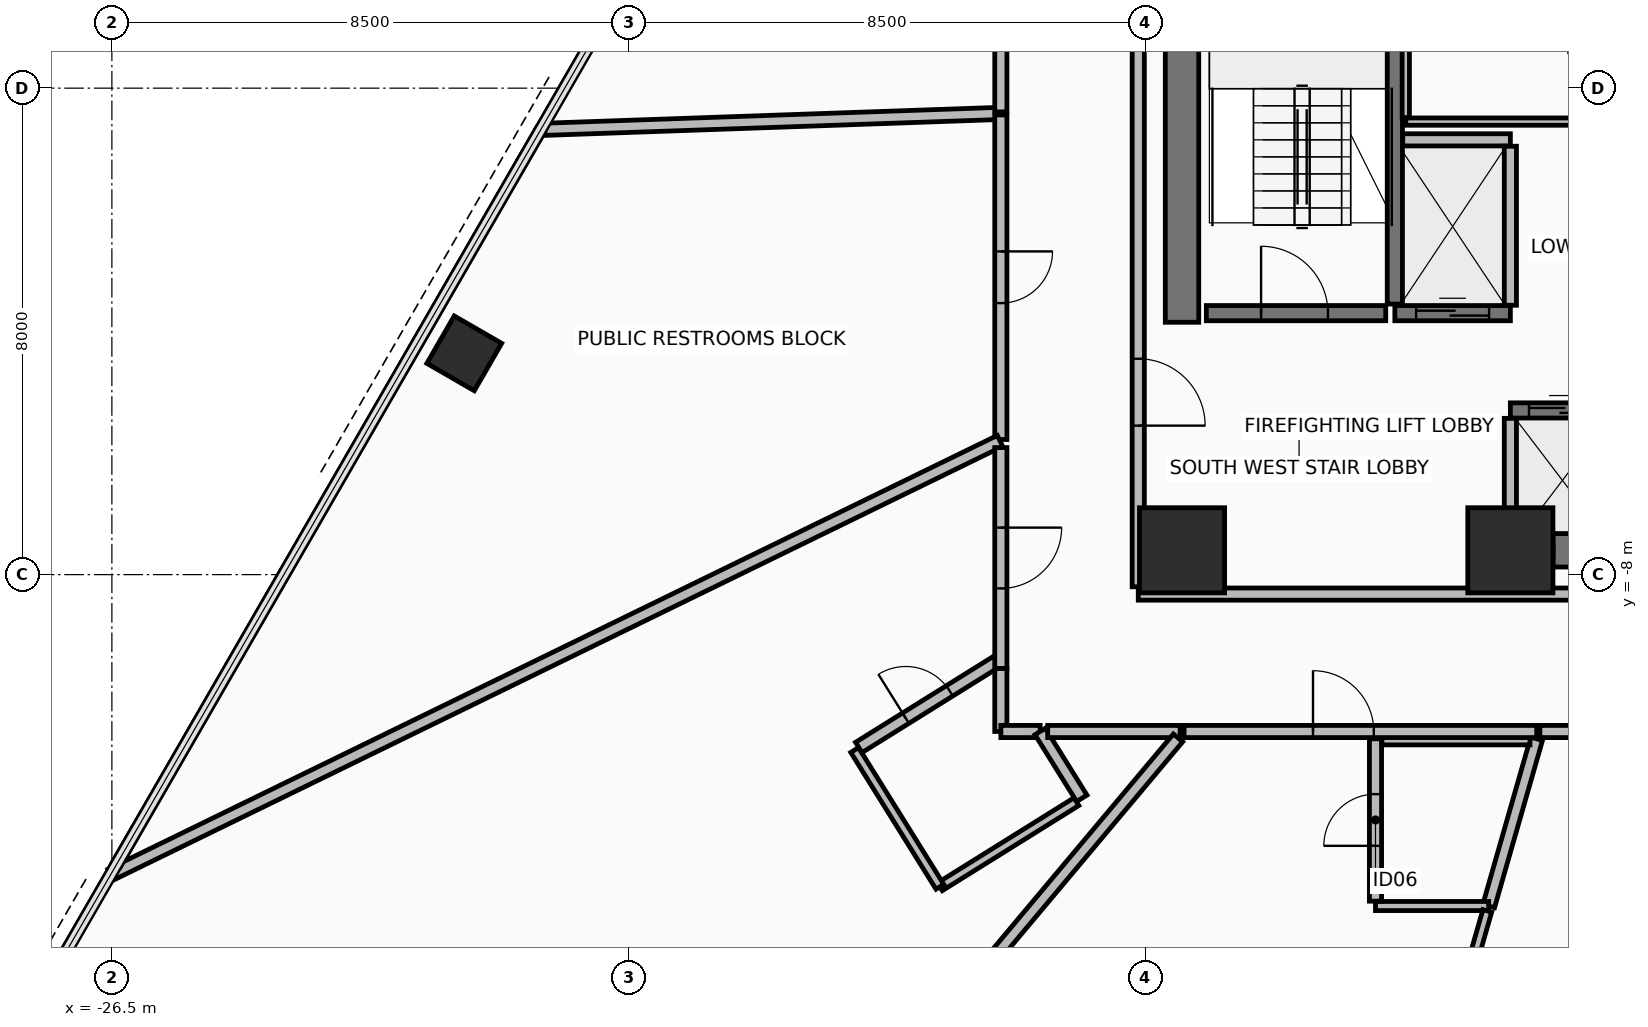
"""IFC4 building model, lengths in metres.
Left out: names, types, materials, properties, quantities, classifications, styles, units other than length and angle.
Written with IfcOpenShell. Run it as: python <this file> out.ifc"""

import sys

from ifc_helpers import new_model, si_unit, direction, frame, frame_2d, origin, origin_2d, place, context, subcontext, project, spatial, rectangle, hollow_rectangle, extrude, element, fill, save


model = new_model("IFC4")
c1 = context("Model", 3, precision=1e-05, world=origin(), true_north=direction((0.0, 1.0)))
c2 = subcontext(c1, "Body", "Model", "MODEL_VIEW")
j1 = project(units=[si_unit("LENGTHUNIT", "METRE"), si_unit("PLANEANGLEUNIT", "RADIAN")], contexts=[c1])
p1 = place(None, origin())
s1 = spatial("IfcSite", under=j1, at=p1, CompositionType="ELEMENT")
p2 = place(p1, origin())
s2 = spatial("IfcBuilding", under=s1, at=p2, CompositionType="ELEMENT")
p3 = place(p2, frame((0.0, 0.0, 35.25)))
s3 = spatial("IfcBuildingStorey", under=s2, at=p3, CompositionType="ELEMENT", Elevation=35.25)
for number, where, z_axis, x_axis in (
    (1, (-8.9, -7.6, 0.0), (0.0, 0.0, 1.0), (1.0, 0.0, 0.0)),
    (2, (-3.5, -7.6, 0.0), (0.0, 0.0, 1.0), (1.0, 0.0, 0.0)),
):
    element("IfcColumn", number, at=place(p3, frame(where, z_axis=z_axis, x_axis=x_axis)), inside=s3, PredefinedType="COLUMN", context=c2, shape_type="SweptSolid", body=[
        extrude(rectangle(XDim=1.4, YDim=1.4, at=origin_2d()), origin(), (0.0, 0.0, 1.0), 3.4),
    ])
p4 = place(p3, frame((-20.705, -4.361, 0.0), z_axis=(0.0, 0.0, 1.0), x_axis=(0.500001511499, 0.866024531118, 0.0)))
e3 = element("IfcColumn", 3, at=p4, inside=s3, PredefinedType="COLUMN", context=c2, shape_type="SweptSolid", body=[
    extrude(hollow_rectangle(XDim=0.9, YDim=0.9, WallThickness=0.05, at=origin_2d()), origin(), (0.0, 0.0, 1.0), 3.4),
])
p5 = place(p3, frame((-2.8, -7.6, 0.0), z_axis=(0.0, 0.0, 1.0), x_axis=(1.0, 0.0, 0.0)))
e4 = element("IfcWall", 4, at=p5, inside=s3, PredefinedType="SHEAR", context=c2, shape_type="SweptSolid", body=[
    extrude(rectangle(XDim=5.38, YDim=0.55, at=frame_2d((2.69, 0.0))), origin(), (0.0, 0.0, 1.0), 3.225),
])
p6 = place(p3, frame((-8.9, -3.85, 0.0), z_axis=(0.0, 0.0, 1.0), x_axis=(0.0, 1.0, 0.0)))
e5 = element("IfcWall", 5, at=p6, inside=s3, PredefinedType="SHEAR", context=c2, shape_type="SweptSolid", body=[
    extrude(rectangle(XDim=10.7, YDim=0.55, at=frame_2d((5.35, 0.0))), origin(), (0.0, 0.0, 1.0), 3.225),
])
p7 = place(p3, frame((-9.62, -8.32, 0.0), z_axis=(0.0, 0.0, 1.0), x_axis=(1.0, 0.0, 0.0)))
e6 = element("IfcWall", 6, at=p7, inside=s3, PredefinedType="PARTITIONING", context=c2, shape_type="SweptSolid", body=[
    extrude(rectangle(XDim=19.24, YDim=0.2, at=frame_2d((9.62, 0.0))), origin(), (0.0, 0.0, 1.0), 2.62),
])
p8 = place(p7, frame((15.02, 0.0, 0.0)))
e7 = element("IfcOpeningElement", 7, at=p8, cuts=e6, PredefinedType="OPENING", context=c2, shape_type="SweptSolid", body=[
    extrude(rectangle(XDim=0.9, YDim=2.1, at=frame_2d((0.45, 1.05))), frame((0.0, 0.11, 0.0), z_axis=(0.0, -1.0, 0.0), x_axis=(1.0, 0.0, 0.0)), (0.0, 0.0, 1.0), 0.22),
])
p9 = place(p3, frame((-9.62, 8.2, 0.0), z_axis=(0.0, 0.0, 1.0), x_axis=(0.0, -1.0, 0.0)))
e8 = element("IfcWall", 8, at=p9, inside=s3, PredefinedType="PARTITIONING", context=c2, shape_type="SweptSolid", body=[
    extrude(rectangle(XDim=16.4, YDim=0.2, at=frame_2d((8.2, 0.0))), origin(), (0.0, 0.0, 1.0), 2.62),
])
p10 = place(p9, frame((12.65, 0.0, 0.0)))
e9 = element("IfcOpeningElement", 9, at=p10, cuts=e8, PredefinedType="OPENING", context=c2, shape_type="SweptSolid", body=[
    extrude(rectangle(XDim=1.1, YDim=2.15, at=frame_2d((0.55, 1.075))), frame((0.0, 0.11, 0.0), z_axis=(0.0, -1.0, 0.0), x_axis=(1.0, 0.0, 0.0)), (0.0, 0.0, 1.0), 0.22),
])
p11 = place(p3, frame((-5.4, -3.55, 0.0), z_axis=(0.0, 0.0, 1.0), x_axis=(0.0, 1.0, 0.0)))
e10 = element("IfcWall", 10, at=p11, inside=s3, PredefinedType="SHEAR", context=c2, shape_type="SweptSolid", body=[
    extrude(rectangle(XDim=7.3, YDim=0.25, at=frame_2d((3.65, 0.0))), origin(), (0.0, 0.0, 1.0), 3.225),
])
p12 = place(p3, frame((-8.5, -3.7, 0.0), z_axis=(0.0, 0.0, 1.0), x_axis=(1.0, 0.0, 0.0)))
e11 = element("IfcWall", 11, at=p12, inside=s3, PredefinedType="SHEAR", context=c2, shape_type="SweptSolid", body=[
    extrude(rectangle(XDim=2.95, YDim=0.25, at=frame_2d((1.475, 0.0))), origin(), (0.0, 0.0, 1.0), 3.225),
])
p13 = place(p12, frame((0.9, 0.0, 0.0)))
e12 = element("IfcOpeningElement", 12, at=p13, cuts=e11, PredefinedType="OPENING", context=c2, shape_type="SweptSolid", body=[
    extrude(rectangle(XDim=1.1, YDim=2.15, at=frame_2d((0.55, 1.075))), frame((0.0, 0.135, 0.0), z_axis=(0.0, -1.0, 0.0), x_axis=(1.0, 0.0, 0.0)), (0.0, 0.0, 1.0), 0.27),
])
p14 = place(p3, frame((-3.5, -5.3, 0.0), z_axis=(0.0, 0.0, 1.0), x_axis=(1.0, 0.0, 0.0)))
e13 = element("IfcWall", 13, at=p14, inside=s3, PredefinedType="SHEAR", context=c2, shape_type="SweptSolid", body=[
    extrude(rectangle(XDim=1.712, YDim=0.25, at=frame_2d((0.856, 0.0))), origin(), (0.0, 0.0, 1.0), 3.225),
])
p15 = place(p14, frame((0.306, 0.0, 0.0)))
e14 = element("IfcOpeningElement", 14, at=p15, cuts=e13, PredefinedType="OPENING", context=c2, shape_type="SweptSolid", body=[
    extrude(rectangle(XDim=1.1, YDim=2.2, at=frame_2d((0.55, 1.1))), frame((0.0, 0.135, 0.0), z_axis=(0.0, -1.0, 0.0), x_axis=(1.0, 0.0, 0.0)), (0.0, 0.0, 1.0), 0.27),
])
p16 = place(p3, frame((-3.5, -7.6, 0.0), z_axis=(0.0, 0.0, 1.0), x_axis=(1.0, 0.0, 0.0)))
e15 = element("IfcWall", 15, at=p16, inside=s3, PredefinedType="PARTITIONING", context=c2, shape_type="SweptSolid", body=[
    extrude(rectangle(XDim=0.7, YDim=0.2, at=frame_2d((0.35, 0.0))), origin(), (0.0, 0.0, 1.0), 2.42),
])
p17 = place(p3, frame((-3.5, -7.495, 0.0), z_axis=(0.0, 0.0, 1.0), x_axis=(0.0, 1.0, 0.0)))
e16 = element("IfcWall", 16, at=p17, inside=s3, PredefinedType="PARTITIONING", context=c2, shape_type="SweptSolid", body=[
    extrude(rectangle(XDim=2.065, YDim=0.2, at=frame_2d((1.033, 0.0))), origin(), (0.0, 0.0, 1.0), 2.42),
])
p18 = place(p3, frame((-5.4, -3.7, 0.0), z_axis=(0.0, 0.0, 1.0), x_axis=(1.0, 0.0, 0.0)))
e17 = element("IfcWall", 17, at=p18, inside=s3, PredefinedType="SHEAR", context=c2, shape_type="SweptSolid", body=[
    extrude(rectangle(XDim=1.9, YDim=0.25, at=frame_2d((0.95, 0.0))), origin(), (0.0, 0.0, 1.0), 3.225),
])
p19 = place(p18, frame((0.35, 0.0, 0.0)))
e18 = element("IfcOpeningElement", 18, at=p19, cuts=e17, PredefinedType="OPENING", context=c2, shape_type="SweptSolid", body=[
    extrude(rectangle(XDim=1.2, YDim=2.2, at=frame_2d((0.6, 1.1))), frame((0.0, 0.135, 0.0), z_axis=(0.0, -1.0, 0.0), x_axis=(1.0, 0.0, 0.0)), (0.0, 0.0, 1.0), 0.27),
])
p20 = place(p3, frame((-5.27, -0.85, 0.0), z_axis=(0.0, 0.0, 1.0), x_axis=(1.0, 0.0, 0.0)))
e19 = element("IfcWall", 19, at=p20, inside=s3, PredefinedType="PARTITIONING", context=c2, shape_type="SweptSolid", body=[
    extrude(rectangle(XDim=1.77, YDim=0.2, at=frame_2d((0.885, 0.0))), origin(), (0.0, 0.0, 1.0), 3.225),
])
p21 = place(p3, frame((-3.5, -3.57, 0.0), z_axis=(0.0, 0.0, 1.0), x_axis=(0.0, 1.0, 0.0)))
e20 = element("IfcWall", 20, at=p21, inside=s3, PredefinedType="PARTITIONING", context=c2, shape_type="SweptSolid", body=[
    extrude(rectangle(XDim=2.615, YDim=0.2, at=frame_2d((1.308, 0.0))), origin(), (0.0, 0.0, 1.0), 3.225),
])
p22 = place(p3, frame((-5.22, -0.55, 0.0), z_axis=(0.0, 0.0, 1.0), x_axis=(1.0, 0.0, 0.0)))
e21 = element("IfcWall", 21, at=p22, inside=s3, PredefinedType="PARTITIONING", context=c2, shape_type="SweptSolid", body=[
    extrude(rectangle(XDim=3.47, YDim=0.12, at=frame_2d((1.735, 0.0))), origin(), (0.0, 0.0, 1.0), 3.225),
])
p23 = place(p3, frame((-5.22, 1.275, 0.0), z_axis=(0.0, 0.0, 1.0), x_axis=(0.0, -1.0, 0.0)))
e22 = element("IfcWall", 22, at=p23, inside=s3, PredefinedType="PARTITIONING", context=c2, shape_type="SweptSolid", body=[
    extrude(rectangle(XDim=1.76, YDim=0.12, at=frame_2d((0.88, 0.0))), origin(), (0.0, 0.0, 1.0), 3.225),
])
p24 = place(p3, frame((-11.88, -9.542, 0.0), z_axis=(0.0, 0.0, 1.0), x_axis=(0.0, -1.0, 0.0)))
e23 = element("IfcWall", 23, at=p24, inside=s3, PredefinedType="PARTITIONING", context=c2, shape_type="SweptSolid", body=[
    extrude(rectangle(XDim=1.037, YDim=0.2, at=frame_2d((0.519, 0.0))), origin(), (0.0, 0.0, 1.0), 2.62),
])
p25 = place(p3, frame((-11.879, -10.58, 0.0), z_axis=(0.0, 0.0, 1.0), x_axis=(1.0, 0.0, 0.0)))
e24 = element("IfcWall", 24, at=p25, inside=s3, PredefinedType="PARTITIONING", context=c2, shape_type="SweptSolid", body=[
    extrude(rectangle(XDim=0.646, YDim=0.2, at=frame_2d((0.323, 0.0))), origin(), (0.0, 0.0, 1.0), 3.225),
])
p26 = place(p3, frame((-11.233, -10.58, 0.0), z_axis=(0.0, 0.0, 1.0), x_axis=(0.528981470097, -0.848633374487, 0.0)))
e25 = element("IfcWall", 25, at=p26, inside=s3, PredefinedType="PARTITIONING", context=c2, shape_type="SweptSolid", body=[
    extrude(rectangle(XDim=1.295, YDim=0.2, at=frame_2d((0.647, 0.0))), origin(), (0.0, 0.0, 1.0), 3.225),
])
p27 = place(p3, frame((-10.637, -11.734, 0.0), z_axis=(0.0, 0.0, 1.0), x_axis=(-0.848630335856, -0.528986344876, 0.0)))
e26 = element("IfcWall", 26, at=p27, inside=s3, PredefinedType="PARTITIONING", context=c2, shape_type="SweptSolid", body=[
    extrude(rectangle(XDim=2.645, YDim=0.15, at=frame_2d((1.323, 0.0))), origin(), (0.0, 0.0, 1.0), 3.225),
])
p28 = place(p3, frame((-12.882, -13.133, 0.0), z_axis=(0.0, 0.0, 1.0), x_axis=(-0.529013096747, 0.848613659724, 0.0)))
e27 = element("IfcWall", 27, at=p28, inside=s3, PredefinedType="PARTITIONING", context=c2, shape_type="SweptSolid", body=[
    extrude(rectangle(XDim=2.65, YDim=0.15, at=frame_2d((1.325, 0.0))), origin(), (0.0, 0.0, 1.0), 2.62),
])
p29 = place(p3, frame((-14.216, -10.842, 0.0), z_axis=(0.0, 0.0, 1.0), x_axis=(0.848598757422, 0.529037001449, 0.0)))
e28 = element("IfcWall", 28, at=p29, inside=s3, PredefinedType="PARTITIONING", context=c2, shape_type="SweptSolid", body=[
    extrude(rectangle(XDim=2.67, YDim=0.2, at=frame_2d((1.335, 0.0))), origin(), (0.0, 0.0, 1.0), 2.62),
])
p30 = place(p29, frame((0.91, 0.0, 0.0)))
e29 = element("IfcOpeningElement", 29, at=p30, cuts=e28, PredefinedType="OPENING", context=c2, shape_type="SweptSolid", body=[
    extrude(rectangle(XDim=0.85, YDim=2.1, at=frame_2d((0.425, 1.05))), frame((0.0, 0.11, 0.0), z_axis=(0.0, -1.0, 0.0), x_axis=(1.0, 0.0, 0.0)), (0.0, 0.0, 1.0), 0.22),
])
p31 = place(p3, frame((-3.068, -10.7, 0.0), z_axis=(0.0, 0.0, 1.0), x_axis=(-0.275645239358, -0.961259435334, 0.0)))
e30 = element("IfcWall", 30, at=p31, inside=s3, PredefinedType="PARTITIONING", context=c2, shape_type="SweptSolid", body=[
    extrude(rectangle(XDim=2.861, YDim=0.2, at=frame_2d((1.43, 0.0))), origin(), (0.0, 0.0, 1.0), 3.225),
])
p32 = place(p3, frame((-3.857, -13.45, 0.0), z_axis=(0.0, 0.0, 1.0), x_axis=(-1.0, 0.0, 0.0)))
e31 = element("IfcWall", 31, at=p32, inside=s3, PredefinedType="PARTITIONING", context=c2, shape_type="SweptSolid", body=[
    extrude(rectangle(XDim=1.862, YDim=0.15, at=frame_2d((0.931, 0.0))), origin(), (0.0, 0.0, 1.0), 3.225),
])
p33 = place(p3, frame((-5.718, -13.37, 0.0), z_axis=(0.0, 0.0, 1.0), x_axis=(0.0, 1.0, 0.0)))
e32 = element("IfcWall", 32, at=p33, inside=s3, PredefinedType="PARTITIONING", context=c2, shape_type="SweptSolid", body=[
    extrude(rectangle(XDim=2.67, YDim=0.2, at=frame_2d((1.335, 0.0))), origin(), (0.0, 0.0, 1.0), 3.225),
])
p34 = place(p33, frame((0.91, 0.0, 0.0)))
e33 = element("IfcOpeningElement", 33, at=p34, cuts=e32, PredefinedType="OPENING", context=c2, shape_type="SweptSolid", body=[
    extrude(rectangle(XDim=0.85, YDim=2.1, at=frame_2d((0.425, 1.05))), frame((0.0, 0.11, 0.0), z_axis=(0.0, -1.0, 0.0), x_axis=(1.0, 0.0, 0.0)), (0.0, 0.0, 1.0), 0.22),
])
p35 = place(p3, frame((-5.613, -10.7, 0.0), z_axis=(0.0, 0.0, 1.0), x_axis=(1.0, 0.0, 0.0)))
e34 = element("IfcWall", 34, at=p35, inside=s3, PredefinedType="PARTITIONING", context=c2, shape_type="SweptSolid", body=[
    extrude(rectangle(XDim=2.436, YDim=0.2, at=frame_2d((1.218, 0.0))), origin(), (0.0, 0.0, 1.0), 3.225),
])
p36 = place(p3, frame((-19.431, -0.678, 0.0), z_axis=(0.0, 0.0, 1.0), x_axis=(0.999391197854, 0.034888875767, 0.0)))
e35 = element("IfcWall", 35, at=p36, inside=s3, PredefinedType="PARTITIONING", context=c2, shape_type="SweptSolid", body=[
    extrude(rectangle(XDim=7.53, YDim=0.2, at=frame_2d((3.765, 0.0))), origin(), (0.0, 0.0, 1.0), 2.42),
])
p37 = place(p3, frame((-11.88, -0.441, 0.0), z_axis=(0.0, 0.0, 1.0), x_axis=(0.0, -1.0, 0.0)))
e36 = element("IfcWall", 36, at=p37, inside=s3, PredefinedType="PARTITIONING", context=c2, shape_type="SweptSolid", body=[
    extrude(rectangle(XDim=5.338, YDim=0.2, at=frame_2d((2.669, 0.0))), origin(), (0.0, 0.0, 1.0), 3.225),
])
p38 = place(p37, frame((2.244, 0.0, 0.0)))
e37 = element("IfcOpeningElement", 37, at=p38, cuts=e36, PredefinedType="OPENING", context=c2, shape_type="SweptSolid", body=[
    extrude(rectangle(XDim=0.85, YDim=2.1, at=frame_2d((0.425, 1.05))), frame((0.0, 0.11, 0.0), z_axis=(0.0, -1.0, 0.0), x_axis=(1.0, 0.0, 0.0)), (0.0, 0.0, 1.0), 0.22),
])
p39 = place(p3, frame((-11.894, -5.801, 0.0), z_axis=(0.0, 0.0, 1.0), x_axis=(-0.898794397302, -0.438370427127, 0.0)))
e38 = element("IfcWall", 38, at=p39, inside=s3, PredefinedType="PARTITIONING", context=c2, shape_type="SweptSolid", body=[
    extrude(rectangle(XDim=16.273, YDim=0.2, at=frame_2d((8.137, 0.0))), origin(), (0.0, 0.0, 1.0), 2.42),
])
p40 = place(p3, frame((-26.427, -12.772, 0.0), z_axis=(0.0, 0.0, 1.0), x_axis=(0.499997662712, 0.866026753214, 0.0)))
e39 = element("IfcWall", 39, at=p40, inside=s3, PredefinedType="PARTITIONING", context=c2, shape_type="SweptSolid", body=[
    extrude(rectangle(XDim=13.95, YDim=0.15, at=frame_2d((6.975, 0.0))), origin(), (0.0, 0.0, 1.0), 3.225),
])
p41 = place(p3, frame((-11.88, 4.783, 0.0), z_axis=(0.0, 0.0, 1.0), x_axis=(0.0, -1.0, 0.0)))
e40 = element("IfcWall", 40, at=p41, inside=s3, PredefinedType="PARTITIONING", context=c2, shape_type="SweptSolid", body=[
    extrude(rectangle(XDim=5.174, YDim=0.2, at=frame_2d((2.587, 0.0))), origin(), (0.0, 0.0, 1.0), 2.82),
])
p42 = place(p41, frame((1.987, 0.0, 0.0)))
e41 = element("IfcOpeningElement", 41, at=p42, cuts=e40, PredefinedType="OPENING", context=c2, shape_type="SweptSolid", body=[
    extrude(rectangle(XDim=1.2, YDim=2.15, at=frame_2d((0.6, 1.075))), frame((0.0, 0.11, 0.0), z_axis=(0.0, -1.0, 0.0), x_axis=(1.0, 0.0, 0.0)), (0.0, 0.0, 1.0), 0.22),
])
p43 = place(p3, frame((-11.88, -5.911, 0.0), z_axis=(0.0, 0.0, 1.0), x_axis=(0.0, -1.0, 0.0)))
e42 = element("IfcWall", 42, at=p43, inside=s3, PredefinedType="PARTITIONING", context=c2, shape_type="SweptSolid", body=[
    extrude(rectangle(XDim=3.631, YDim=0.2, at=frame_2d((1.816, 0.0))), origin(), (0.0, 0.0, 1.0), 2.62),
])
p44 = place(p43, frame((1.316, 0.0, 0.0)))
e43 = element("IfcOpeningElement", 43, at=p44, cuts=e42, PredefinedType="OPENING", context=c2, shape_type="SweptSolid", body=[
    extrude(rectangle(XDim=1.0, YDim=2.15, at=frame_2d((0.5, 1.075))), frame((0.0, 0.11, 0.0), z_axis=(0.0, -1.0, 0.0), x_axis=(1.0, 0.0, 0.0)), (0.0, 0.0, 1.0), 0.22),
])
p45 = place(p3, frame((-11.11, -10.58, 0.0), z_axis=(0.0, 0.0, 1.0), x_axis=(1.0, 0.0, 0.0)))
e44 = element("IfcWall", 44, at=p45, inside=s3, PredefinedType="PARTITIONING", context=c2, shape_type="SweptSolid", body=[
    extrude(rectangle(XDim=2.178, YDim=0.2, at=frame_2d((1.089, 0.0))), origin(), (0.0, 0.0, 1.0), 2.62),
])
p46 = place(p3, frame((-8.966, -10.685, 0.0), z_axis=(0.0, 0.0, 1.0), x_axis=(-0.642784617016, -0.766046954258, 0.0)))
e45 = element("IfcWall", 45, at=p46, inside=s3, PredefinedType="PARTITIONING", context=c2, shape_type="SweptSolid", body=[
    extrude(rectangle(XDim=16.978, YDim=0.2, at=frame_2d((8.489, 0.0))), origin(), (0.0, 0.0, 1.0), 2.42),
])
p47 = place(p3, frame((-8.866, -10.58, 0.0), z_axis=(0.0, 0.0, 1.0), x_axis=(1.0, 0.0, 0.0)))
e46 = element("IfcWall", 46, at=p47, inside=s3, PredefinedType="PARTITIONING", context=c2, shape_type="SweptSolid", body=[
    extrude(rectangle(XDim=5.799, YDim=0.2, at=frame_2d((2.899, 0.0))), origin(), (0.0, 0.0, 1.0), 2.62),
])
p48 = place(p47, frame((2.12, 0.0, 0.0)))
e47 = element("IfcOpeningElement", 47, at=p48, cuts=e46, PredefinedType="OPENING", context=c2, shape_type="SweptSolid", body=[
    extrude(rectangle(XDim=1.0, YDim=2.15, at=frame_2d((0.5, 1.075))), frame((0.0, 0.11, 0.0), z_axis=(0.0, -1.0, 0.0), x_axis=(1.0, 0.0, 0.0)), (0.0, 0.0, 1.0), 0.22),
])
p49 = place(p3, frame((-3.88, -13.53, 0.0), z_axis=(0.0, 0.0, 1.0), x_axis=(-0.275649176222, -0.961258306413, 0.0)))
e48 = element("IfcWall", 48, at=p49, inside=s3, PredefinedType="PARTITIONING", context=c2, shape_type="SweptSolid", body=[
    extrude(rectangle(XDim=10.561, YDim=0.15, at=frame_2d((5.281, 0.0))), origin(), (0.0, 0.0, 1.0), 2.42),
])
p50 = place(p3, frame((-3.015, -10.58, 0.0), z_axis=(0.0, 0.0, 1.0), x_axis=(1.0, 0.0, 0.0)))
e49 = element("IfcWall", 49, at=p50, inside=s3, PredefinedType="PARTITIONING", context=c2, shape_type="SweptSolid", body=[
    extrude(rectangle(XDim=4.48, YDim=0.2, at=frame_2d((2.24, 0.0))), origin(), (0.0, 0.0, 1.0), 3.225),
])
p51 = place(p50, frame((1.64, 0.0, 0.0)))
e50 = element("IfcOpeningElement", 50, at=p51, cuts=e49, PredefinedType="OPENING", context=c2, shape_type="SweptSolid", body=[
    extrude(rectangle(XDim=1.2, YDim=2.15, at=frame_2d((0.6, 1.075))), frame((0.0, 0.11, 0.0), z_axis=(0.0, -1.0, 0.0), x_axis=(1.0, 0.0, 0.0)), (0.0, 0.0, 1.0), 0.22),
])
p52 = place(p10, frame((1.1, 0.0, 0.0), z_axis=(0.0, 0.0, 1.0), x_axis=(-1.0, 0.0, 0.0)))
e51 = element("IfcDoor", 51, at=p52, inside=s3, OperationType="SINGLE_SWING_LEFT", PredefinedType="DOOR", context=c2, shape_type="SweptSolid", body=[
    extrude(rectangle(XDim=1.1, YDim=2.15, at=frame_2d((0.55, 1.075))), frame((0.0, 0.025, 0.0), z_axis=(0.0, -1.0, 0.0), x_axis=(1.0, 0.0, 0.0)), (0.0, 0.0, 1.0), 0.05),
])
fill(e9, e51)
p53 = place(p13, origin())
e52 = element("IfcDoor", 52, at=p53, inside=s3, OperationType="SINGLE_SWING_LEFT", PredefinedType="DOOR", context=c2, shape_type="SweptSolid", body=[
    extrude(rectangle(XDim=1.1, YDim=2.15, at=frame_2d((0.55, 1.075))), frame((0.0, 0.025, 0.0), z_axis=(0.0, -1.0, 0.0), x_axis=(1.0, 0.0, 0.0)), (0.0, 0.0, 1.0), 0.05),
])
fill(e12, e52)
p54 = place(p15, origin())
e53 = element("IfcDoor", 53, at=p54, inside=s3, OperationType="SLIDING_TO_LEFT", PredefinedType="DOOR", context=c2, shape_type="SweptSolid", body=[
    extrude(rectangle(XDim=1.1, YDim=2.2, at=frame_2d((0.55, 1.1))), frame((0.0, 0.025, 0.0), z_axis=(0.0, -1.0, 0.0), x_axis=(1.0, 0.0, 0.0)), (0.0, 0.0, 1.0), 0.05),
])
fill(e14, e53)
p55 = place(p19, origin())
e54 = element("IfcDoor", 54, at=p55, inside=s3, OperationType="SLIDING_TO_RIGHT", PredefinedType="DOOR", context=c2, shape_type="SweptSolid", body=[
    extrude(rectangle(XDim=1.2, YDim=2.2, at=frame_2d((0.6, 1.1))), frame((0.0, 0.025, 0.0), z_axis=(0.0, -1.0, 0.0), x_axis=(1.0, 0.0, 0.0)), (0.0, 0.0, 1.0), 0.05),
])
fill(e18, e54)
p56 = place(p30, origin())
e55 = element("IfcDoor", 55, at=p56, inside=s3, OperationType="SINGLE_SWING_RIGHT", PredefinedType="DOOR", context=c2, shape_type="SweptSolid", body=[
    extrude(rectangle(XDim=0.85, YDim=2.1, at=frame_2d((0.425, 1.05))), frame((0.0, 0.025, 0.0), z_axis=(0.0, -1.0, 0.0), x_axis=(1.0, 0.0, 0.0)), (0.0, 0.0, 1.0), 0.05),
])
fill(e29, e55)
p57 = place(p34, origin())
e56 = element("IfcDoor", 56, at=p57, inside=s3, OperationType="SINGLE_SWING_RIGHT", PredefinedType="DOOR", context=c2, shape_type="SweptSolid", body=[
    extrude(rectangle(XDim=0.85, YDim=2.1, at=frame_2d((0.425, 1.05))), frame((0.0, 0.025, 0.0), z_axis=(0.0, -1.0, 0.0), x_axis=(1.0, 0.0, 0.0)), (0.0, 0.0, 1.0), 0.05),
])
fill(e33, e56)
p58 = place(p38, origin())
e57 = element("IfcDoor", 57, at=p58, inside=s3, OperationType="SINGLE_SWING_RIGHT", PredefinedType="DOOR", context=c2, shape_type="SweptSolid", body=[
    extrude(rectangle(XDim=0.85, YDim=2.1, at=frame_2d((0.425, 1.05))), frame((0.0, 0.025, 0.0), z_axis=(0.0, -1.0, 0.0), x_axis=(1.0, 0.0, 0.0)), (0.0, 0.0, 1.0), 0.05),
])
fill(e37, e57)
p59 = place(p44, origin())
e58 = element("IfcDoor", 58, at=p59, inside=s3, OperationType="SINGLE_SWING_LEFT", PredefinedType="DOOR", context=c2, shape_type="SweptSolid", body=[
    extrude(rectangle(XDim=1.0, YDim=2.15, at=frame_2d((0.5, 1.075))), frame((0.0, 0.025, 0.0), z_axis=(0.0, -1.0, 0.0), x_axis=(1.0, 0.0, 0.0)), (0.0, 0.0, 1.0), 0.05),
])
fill(e43, e58)
p60 = place(p48, origin())
e59 = element("IfcDoor", 59, at=p60, inside=s3, OperationType="SINGLE_SWING_LEFT", PredefinedType="DOOR", context=c2, shape_type="SweptSolid", body=[
    extrude(rectangle(XDim=1.0, YDim=2.15, at=frame_2d((0.5, 1.075))), frame((0.0, 0.025, 0.0), z_axis=(0.0, -1.0, 0.0), x_axis=(1.0, 0.0, 0.0)), (0.0, 0.0, 1.0), 0.05),
])
fill(e47, e59)
save(model, sys.argv[1])
